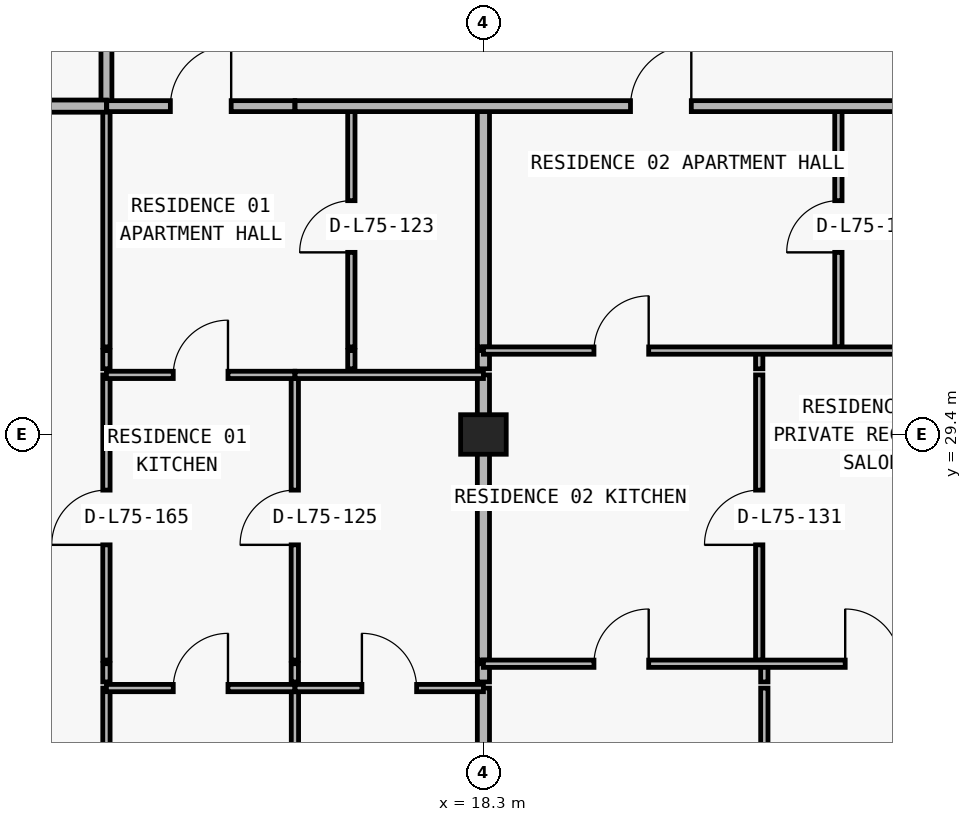
"""IFC4 building model, lengths in metres.
Left out: names, types, materials, properties, quantities, classifications, styles, units other than length and angle.
Written with IfcOpenShell. Run it as: python <this file> out.ifc"""

import sys

from ifc_helpers import new_model, si_unit, direction, frame, frame_2d, origin, origin_2d, place, context, subcontext, project, spatial, rectangle, extrude, element, fill, save


model = new_model("IFC4")
c1 = context("Model", 3, precision=1e-05, world=origin(), true_north=direction((0.0, 1.0)))
c2 = subcontext(c1, "Body", "Model", "MODEL_VIEW")
j1 = project(units=[si_unit("LENGTHUNIT", "METRE"), si_unit("PLANEANGLEUNIT", "RADIAN")], contexts=[c1])
p1 = place(None, origin())
s1 = spatial("IfcSite", under=j1, at=p1, CompositionType="ELEMENT")
p2 = place(p1, origin())
s2 = spatial("IfcBuilding", under=s1, at=p2, CompositionType="ELEMENT")
p3 = place(p2, frame((0.0, 0.0, 266.1)))
s3 = spatial("IfcBuildingStorey", under=s2, at=p3, CompositionType="ELEMENT", Elevation=266.1)
p4 = place(p3, frame((18.3, 29.4, 0.0), z_axis=(0.0, 0.0, 1.0), x_axis=(1.0, 0.0, 0.0)))
e1 = element("IfcColumn", 1, at=p4, inside=s3, PredefinedType="COLUMN", context=c2, shape_type="SweptSolid", body=[
    extrude(rectangle(XDim=0.75, YDim=0.65, at=origin_2d()), origin(), (0.0, 0.0, 1.0), 3.0),
])
p5 = place(p3, frame((12.1, 13.385, 0.0), z_axis=(0.0, 0.0, 1.0), x_axis=(0.0, 1.0, 0.0)))
e2 = element("IfcWall", 2, at=p5, inside=s3, PredefinedType="PARTITIONING", context=c2, shape_type="SweptSolid", body=[
    extrude(rectangle(XDim=11.845, YDim=0.12, at=frame_2d((5.922, 0.0))), origin(), (0.0, 0.0, 1.0), 3.0),
])
p6 = place(p3, frame((12.1, 25.33, 0.0), z_axis=(0.0, 0.0, 1.0), x_axis=(0.0, 1.0, 0.0)))
e3 = element("IfcWall", 3, at=p6, inside=s3, PredefinedType="PARTITIONING", context=c2, shape_type="SweptSolid", body=[
    extrude(rectangle(XDim=0.3, YDim=0.12, at=frame_2d((0.15, 0.0))), origin(), (0.0, 0.0, 1.0), 3.0),
])
p7 = place(p3, frame((12.1, 25.69, 0.0), z_axis=(0.0, 0.0, 1.0), x_axis=(0.0, 1.0, 0.0)))
e4 = element("IfcWall", 4, at=p7, inside=s3, PredefinedType="PARTITIONING", context=c2, shape_type="SweptSolid", body=[
    extrude(rectangle(XDim=4.69, YDim=0.12, at=frame_2d((2.345, 0.0))), origin(), (0.0, 0.0, 1.0), 3.0),
])
p8 = place(p7, frame((1.895, 0.0, 0.0)))
e5 = element("IfcOpeningElement", 5, at=p8, cuts=e4, PredefinedType="OPENING", context=c2, shape_type="SweptSolid", body=[
    extrude(rectangle(XDim=0.9, YDim=2.15, at=frame_2d((0.45, 1.075))), frame((0.0, 0.07, 0.0), z_axis=(0.0, -1.0, 0.0), x_axis=(1.0, 0.0, 0.0)), (0.0, 0.0, 1.0), 0.14),
])
p9 = place(p3, frame((12.1, 30.48, 0.0), z_axis=(0.0, 0.0, 1.0), x_axis=(0.0, 1.0, 0.0)))
e6 = element("IfcWall", 6, at=p9, inside=s3, PredefinedType="PARTITIONING", context=c2, shape_type="SweptSolid", body=[
    extrude(rectangle(XDim=0.3, YDim=0.12, at=frame_2d((0.15, 0.0))), origin(), (0.0, 0.0, 1.0), 3.0),
])
p10 = place(p3, frame((12.1, 30.84, 0.0), z_axis=(0.0, 0.0, 1.0), x_axis=(0.0, 1.0, 0.0)))
e7 = element("IfcWall", 7, at=p10, inside=s3, PredefinedType="PARTITIONING", context=c2, shape_type="SweptSolid", body=[
    extrude(rectangle(XDim=3.96, YDim=0.12, at=frame_2d((1.98, 0.0))), origin(), (0.0, 0.0, 1.0), 3.0),
])
p11 = place(p3, frame((12.1, 34.805, 0.0), z_axis=(0.0, 0.0, 1.0), x_axis=(0.0, 1.0, 0.0)))
e8 = element("IfcWall", 8, at=p11, inside=s3, PredefinedType="PARTITIONING", context=c2, shape_type="SweptSolid", body=[
    extrude(rectangle(XDim=2.195, YDim=0.18, at=frame_2d((1.098, 0.0))), origin(), (0.0, 0.0, 1.0), 3.0),
])
p12 = place(p3, frame((15.198, 25.33, 0.0), z_axis=(0.0, 0.0, 1.0), x_axis=(0.0, 1.0, 0.0)))
e9 = element("IfcWall", 9, at=p12, inside=s3, PredefinedType="PARTITIONING", context=c2, shape_type="SweptSolid", body=[
    extrude(rectangle(XDim=0.3, YDim=0.12, at=frame_2d((0.15, 0.0))), origin(), (0.0, 0.0, 1.0), 3.0),
])
p13 = place(p3, frame((15.198, 25.69, 0.0), z_axis=(0.0, 0.0, 1.0), x_axis=(0.0, 1.0, 0.0)))
e10 = element("IfcWall", 10, at=p13, inside=s3, PredefinedType="PARTITIONING", context=c2, shape_type="SweptSolid", body=[
    extrude(rectangle(XDim=4.69, YDim=0.12, at=frame_2d((2.345, 0.0))), origin(), (0.0, 0.0, 1.0), 3.0),
])
p14 = place(p13, frame((1.895, 0.0, 0.0)))
e11 = element("IfcOpeningElement", 11, at=p14, cuts=e10, PredefinedType="OPENING", context=c2, shape_type="SweptSolid", body=[
    extrude(rectangle(XDim=0.9, YDim=2.15, at=frame_2d((0.45, 1.075))), frame((0.0, 0.07, 0.0), z_axis=(0.0, -1.0, 0.0), x_axis=(1.0, 0.0, 0.0)), (0.0, 0.0, 1.0), 0.14),
])
p15 = place(p3, frame((15.2, 13.34, 0.0), z_axis=(0.0, 0.0, 1.0), x_axis=(0.0, 1.0, 0.0)))
e12 = element("IfcWall", 12, at=p15, inside=s3, PredefinedType="PARTITIONING", context=c2, shape_type="SweptSolid", body=[
    extrude(rectangle(XDim=11.89, YDim=0.12, at=frame_2d((5.945, 0.0))), origin(), (0.0, 0.0, 1.0), 3.0),
])
p16 = place(p3, frame((16.128, 30.48, 0.0), z_axis=(0.0, 0.0, 1.0), x_axis=(0.0, 1.0, 0.0)))
e13 = element("IfcWall", 13, at=p16, inside=s3, PredefinedType="PARTITIONING", context=c2, shape_type="SweptSolid", body=[
    extrude(rectangle(XDim=0.3, YDim=0.12, at=frame_2d((0.15, 0.0))), origin(), (0.0, 0.0, 1.0), 3.0),
])
p17 = place(p3, frame((16.128, 30.84, 0.0), z_axis=(0.0, 0.0, 1.0), x_axis=(0.0, 1.0, 0.0)))
e14 = element("IfcWall", 14, at=p17, inside=s3, PredefinedType="PARTITIONING", context=c2, shape_type="SweptSolid", body=[
    extrude(rectangle(XDim=3.96, YDim=0.12, at=frame_2d((1.98, 0.0))), origin(), (0.0, 0.0, 1.0), 3.0),
])
p18 = place(p17, frame((1.555, 0.0, 0.0)))
e15 = element("IfcOpeningElement", 15, at=p18, cuts=e14, PredefinedType="OPENING", context=c2, shape_type="SweptSolid", body=[
    extrude(rectangle(XDim=0.85, YDim=2.1, at=frame_2d((0.425, 1.05))), frame((0.0, 0.07, 0.0), z_axis=(0.0, -1.0, 0.0), x_axis=(1.0, 0.0, 0.0)), (0.0, 0.0, 1.0), 0.14),
])
p19 = place(p3, frame((18.3, 13.34, 0.0), z_axis=(0.0, 0.0, 1.0), x_axis=(0.0, 1.0, 0.0)))
e16 = element("IfcWall", 16, at=p19, inside=s3, PredefinedType="PARTITIONING", context=c2, shape_type="SweptSolid", body=[
    extrude(rectangle(XDim=11.89, YDim=0.2, at=frame_2d((5.945, 0.0))), origin(), (0.0, 0.0, 1.0), 2.213),
])
p20 = place(p3, frame((18.3, 25.33, 0.0), z_axis=(0.0, 0.0, 1.0), x_axis=(0.0, 1.0, 0.0)))
e17 = element("IfcWall", 17, at=p20, inside=s3, PredefinedType="PARTITIONING", context=c2, shape_type="SweptSolid", body=[
    extrude(rectangle(XDim=0.3, YDim=0.2, at=frame_2d((0.15, 0.0))), origin(), (0.0, 0.0, 1.0), 2.213),
])
p21 = place(p3, frame((18.3, 25.69, 0.0), z_axis=(0.0, 0.0, 1.0), x_axis=(0.0, 1.0, 0.0)))
e18 = element("IfcWall", 18, at=p21, inside=s3, PredefinedType="PARTITIONING", context=c2, shape_type="SweptSolid", body=[
    extrude(rectangle(XDim=4.69, YDim=0.2, at=frame_2d((2.345, 0.0))), origin(), (0.0, 0.0, 1.0), 2.213),
])
p22 = place(p3, frame((18.3, 30.48, 0.0), z_axis=(0.0, 0.0, 1.0), x_axis=(0.0, 1.0, 0.0)))
e19 = element("IfcWall", 19, at=p22, inside=s3, PredefinedType="PARTITIONING", context=c2, shape_type="SweptSolid", body=[
    extrude(rectangle(XDim=0.3, YDim=0.2, at=frame_2d((0.15, 0.0))), origin(), (0.0, 0.0, 1.0), 2.213),
])
p23 = place(p3, frame((18.3, 30.84, 0.0), z_axis=(0.0, 0.0, 1.0), x_axis=(0.0, 1.0, 0.0)))
e20 = element("IfcWall", 20, at=p23, inside=s3, PredefinedType="PARTITIONING", context=c2, shape_type="SweptSolid", body=[
    extrude(rectangle(XDim=3.96, YDim=0.2, at=frame_2d((1.98, 0.0))), origin(), (0.0, 0.0, 1.0), 2.213),
])
p24 = place(p3, frame((22.836, 25.69, 0.0), z_axis=(0.0, 0.0, 1.0), x_axis=(0.0, 1.0, 0.0)))
e21 = element("IfcWall", 21, at=p24, inside=s3, PredefinedType="PARTITIONING", context=c2, shape_type="SweptSolid", body=[
    extrude(rectangle(XDim=4.69, YDim=0.12, at=frame_2d((2.345, 0.0))), origin(), (0.0, 0.0, 1.0), 3.0),
])
p25 = place(p24, frame((1.895, 0.0, 0.0)))
e22 = element("IfcOpeningElement", 22, at=p25, cuts=e21, PredefinedType="OPENING", context=c2, shape_type="SweptSolid", body=[
    extrude(rectangle(XDim=0.9, YDim=2.15, at=frame_2d((0.45, 1.075))), frame((0.0, 0.07, 0.0), z_axis=(0.0, -1.0, 0.0), x_axis=(1.0, 0.0, 0.0)), (0.0, 0.0, 1.0), 0.14),
])
p26 = place(p3, frame((22.836, 30.48, 0.0), z_axis=(0.0, 0.0, 1.0), x_axis=(0.0, 1.0, 0.0)))
e23 = element("IfcWall", 23, at=p26, inside=s3, PredefinedType="PARTITIONING", context=c2, shape_type="SweptSolid", body=[
    extrude(rectangle(XDim=0.3, YDim=0.12, at=frame_2d((0.15, 0.0))), origin(), (0.0, 0.0, 1.0), 3.0),
])
p27 = place(p3, frame((22.92, 13.34, 0.0), z_axis=(0.0, 0.0, 1.0), x_axis=(0.0, 1.0, 0.0)))
e24 = element("IfcWall", 24, at=p27, inside=s3, PredefinedType="PARTITIONING", context=c2, shape_type="SweptSolid", body=[
    extrude(rectangle(XDim=11.89, YDim=0.12, at=frame_2d((5.945, 0.0))), origin(), (0.0, 0.0, 1.0), 3.0),
])
p28 = place(p3, frame((22.92, 25.33, 0.0), z_axis=(0.0, 0.0, 1.0), x_axis=(0.0, 1.0, 0.0)))
e25 = element("IfcWall", 25, at=p28, inside=s3, PredefinedType="PARTITIONING", context=c2, shape_type="SweptSolid", body=[
    extrude(rectangle(XDim=0.3, YDim=0.12, at=frame_2d((0.15, 0.0))), origin(), (0.0, 0.0, 1.0), 3.0),
])
p29 = place(p3, frame((24.138, 30.84, 0.0), z_axis=(0.0, 0.0, 1.0), x_axis=(0.0, 1.0, 0.0)))
e26 = element("IfcWall", 26, at=p29, inside=s3, PredefinedType="PARTITIONING", context=c2, shape_type="SweptSolid", body=[
    extrude(rectangle(XDim=3.96, YDim=0.12, at=frame_2d((1.98, 0.0))), origin(), (0.0, 0.0, 1.0), 3.0),
])
p30 = place(p29, frame((1.555, 0.0, 0.0)))
e27 = element("IfcOpeningElement", 27, at=p30, cuts=e26, PredefinedType="OPENING", context=c2, shape_type="SweptSolid", body=[
    extrude(rectangle(XDim=0.85, YDim=2.1, at=frame_2d((0.425, 1.05))), frame((0.0, 0.07, 0.0), z_axis=(0.0, -1.0, 0.0), x_axis=(1.0, 0.0, 0.0)), (0.0, 0.0, 1.0), 0.14),
])
p31 = place(p3, frame((12.1, 25.23, 0.0), z_axis=(0.0, 0.0, 1.0), x_axis=(1.0, 0.0, 0.0)))
e28 = element("IfcWall", 28, at=p31, inside=s3, PredefinedType="PARTITIONING", context=c2, shape_type="SweptSolid", body=[
    extrude(rectangle(XDim=3.098, YDim=0.12, at=frame_2d((1.549, 0.0))), origin(), (0.0, 0.0, 1.0), 3.0),
])
p32 = place(p31, frame((1.099, 0.0, 0.0)))
e29 = element("IfcOpeningElement", 29, at=p32, cuts=e28, PredefinedType="OPENING", context=c2, shape_type="SweptSolid", body=[
    extrude(rectangle(XDim=0.9, YDim=2.15, at=frame_2d((0.45, 1.075))), frame((0.0, 0.07, 0.0), z_axis=(0.0, -1.0, 0.0), x_axis=(1.0, 0.0, 0.0)), (0.0, 0.0, 1.0), 0.14),
])
p33 = place(p3, frame((15.203, 25.23, 0.0), z_axis=(0.0, 0.0, 1.0), x_axis=(1.0, 0.0, 0.0)))
e30 = element("IfcWall", 30, at=p33, inside=s3, PredefinedType="PARTITIONING", context=c2, shape_type="SweptSolid", body=[
    extrude(rectangle(XDim=3.097, YDim=0.12, at=frame_2d((1.549, 0.0))), origin(), (0.0, 0.0, 1.0), 3.0),
])
p34 = place(p33, frame((1.098, 0.0, 0.0)))
e31 = element("IfcOpeningElement", 31, at=p34, cuts=e30, PredefinedType="OPENING", context=c2, shape_type="SweptSolid", body=[
    extrude(rectangle(XDim=0.9, YDim=2.15, at=frame_2d((0.45, 1.075))), frame((0.0, 0.07, 0.0), z_axis=(0.0, -1.0, 0.0), x_axis=(1.0, 0.0, 0.0)), (0.0, 0.0, 1.0), 0.14),
])
p35 = place(p3, frame((18.3, 25.63, 0.0), z_axis=(0.0, 0.0, 1.0), x_axis=(1.0, 0.0, 0.0)))
e32 = element("IfcWall", 32, at=p35, inside=s3, PredefinedType="PARTITIONING", context=c2, shape_type="SweptSolid", body=[
    extrude(rectangle(XDim=8.18, YDim=0.12, at=frame_2d((4.09, 0.0))), origin(), (0.0, 0.0, 1.0), 3.0),
])
p36 = place(p35, frame((1.818, 0.0, 0.0)))
e33 = element("IfcOpeningElement", 33, at=p36, cuts=e32, PredefinedType="OPENING", context=c2, shape_type="SweptSolid", body=[
    extrude(rectangle(XDim=0.9, YDim=2.15, at=frame_2d((0.45, 1.075))), frame((0.0, 0.07, 0.0), z_axis=(0.0, -1.0, 0.0), x_axis=(1.0, 0.0, 0.0)), (0.0, 0.0, 1.0), 0.14),
])
p37 = place(p35, frame((5.95, 0.0, 0.0)))
e34 = element("IfcOpeningElement", 34, at=p37, cuts=e32, PredefinedType="OPENING", context=c2, shape_type="SweptSolid", body=[
    extrude(rectangle(XDim=0.9, YDim=2.15, at=frame_2d((0.45, 1.075))), frame((0.0, 0.07, 0.0), z_axis=(0.0, -1.0, 0.0), x_axis=(1.0, 0.0, 0.0)), (0.0, 0.0, 1.0), 0.14),
])
p38 = place(p3, frame((12.1, 30.38, 0.0), z_axis=(0.0, 0.0, 1.0), x_axis=(1.0, 0.0, 0.0)))
e35 = element("IfcWall", 35, at=p38, inside=s3, PredefinedType="PARTITIONING", context=c2, shape_type="SweptSolid", body=[
    extrude(rectangle(XDim=3.098, YDim=0.12, at=frame_2d((1.549, 0.0))), origin(), (0.0, 0.0, 1.0), 3.0),
])
p39 = place(p38, frame((1.099, 0.0, 0.0)))
e36 = element("IfcOpeningElement", 36, at=p39, cuts=e35, PredefinedType="OPENING", context=c2, shape_type="SweptSolid", body=[
    extrude(rectangle(XDim=0.9, YDim=2.15, at=frame_2d((0.45, 1.075))), frame((0.0, 0.07, 0.0), z_axis=(0.0, -1.0, 0.0), x_axis=(1.0, 0.0, 0.0)), (0.0, 0.0, 1.0), 0.14),
])
p40 = place(p3, frame((15.203, 30.38, 0.0), z_axis=(0.0, 0.0, 1.0), x_axis=(1.0, 0.0, 0.0)))
e37 = element("IfcWall", 37, at=p40, inside=s3, PredefinedType="PARTITIONING", context=c2, shape_type="SweptSolid", body=[
    extrude(rectangle(XDim=3.097, YDim=0.12, at=frame_2d((1.549, 0.0))), origin(), (0.0, 0.0, 1.0), 3.0),
])
p41 = place(p3, frame((18.3, 30.78, 0.0), z_axis=(0.0, 0.0, 1.0), x_axis=(1.0, 0.0, 0.0)))
e38 = element("IfcWall", 38, at=p41, inside=s3, PredefinedType="PARTITIONING", context=c2, shape_type="SweptSolid", body=[
    extrude(rectangle(XDim=8.4, YDim=0.12, at=frame_2d((4.2, 0.0))), origin(), (0.0, 0.0, 1.0), 3.0),
])
p42 = place(p41, frame((1.818, 0.0, 0.0)))
e39 = element("IfcOpeningElement", 39, at=p42, cuts=e38, PredefinedType="OPENING", context=c2, shape_type="SweptSolid", body=[
    extrude(rectangle(XDim=0.9, YDim=2.15, at=frame_2d((0.45, 1.075))), frame((0.0, 0.07, 0.0), z_axis=(0.0, -1.0, 0.0), x_axis=(1.0, 0.0, 0.0)), (0.0, 0.0, 1.0), 0.14),
])
p43 = place(p3, frame((8.395, 34.8, 0.0), z_axis=(0.0, 0.0, 1.0), x_axis=(1.0, 0.0, 0.0)))
e40 = element("IfcWall", 40, at=p43, inside=s3, PredefinedType="PARTITIONING", context=c2, shape_type="SweptSolid", body=[
    extrude(rectangle(XDim=3.705, YDim=0.2, at=frame_2d((1.853, 0.0))), origin(), (0.0, 0.0, 1.0), 3.0),
])
p44 = place(p3, frame((12.105, 34.8, 0.0), z_axis=(0.0, 0.0, 1.0), x_axis=(1.0, 0.0, 0.0)))
e41 = element("IfcWall", 41, at=p44, inside=s3, PredefinedType="PARTITIONING", context=c2, shape_type="SweptSolid", body=[
    extrude(rectangle(XDim=3.093, YDim=0.18, at=frame_2d((1.546, 0.0))), origin(), (0.0, 0.0, 1.0), 3.0),
])
p45 = place(p44, frame((1.046, 0.0, 0.0)))
e42 = element("IfcOpeningElement", 42, at=p45, cuts=e41, PredefinedType="OPENING", context=c2, shape_type="SweptSolid", body=[
    extrude(rectangle(XDim=1.0, YDim=2.2, at=frame_2d((0.5, 1.1))), frame((0.0, 0.1, 0.0), z_axis=(0.0, -1.0, 0.0), x_axis=(1.0, 0.0, 0.0)), (0.0, 0.0, 1.0), 0.2),
])
p46 = place(p3, frame((15.203, 34.8, 0.0), z_axis=(0.0, 0.0, 1.0), x_axis=(1.0, 0.0, 0.0)))
e43 = element("IfcWall", 43, at=p46, inside=s3, PredefinedType="PARTITIONING", context=c2, shape_type="SweptSolid", body=[
    extrude(rectangle(XDim=16.283, YDim=0.18, at=frame_2d((8.142, 0.0))), origin(), (0.0, 0.0, 1.0), 3.0),
])
p47 = place(p46, frame((5.516, 0.0, 0.0)))
e44 = element("IfcOpeningElement", 44, at=p47, cuts=e43, PredefinedType="OPENING", context=c2, shape_type="SweptSolid", body=[
    extrude(rectangle(XDim=1.0, YDim=2.2, at=frame_2d((0.5, 1.1))), frame((0.0, 0.1, 0.0), z_axis=(0.0, -1.0, 0.0), x_axis=(1.0, 0.0, 0.0)), (0.0, 0.0, 1.0), 0.2),
])
p48 = place(p46, frame((13.39, 0.0, 0.0)))
e45 = element("IfcOpeningElement", 45, at=p48, cuts=e43, PredefinedType="OPENING", context=c2, shape_type="SweptSolid", body=[
    extrude(rectangle(XDim=1.0, YDim=2.2, at=frame_2d((0.5, 1.1))), frame((0.0, 0.1, 0.0), z_axis=(0.0, -1.0, 0.0), x_axis=(1.0, 0.0, 0.0)), (0.0, 0.0, 1.0), 0.2),
])
p49 = place(p45, origin())
e46 = element("IfcDoor", 46, at=p49, inside=s3, OperationType="SINGLE_SWING_RIGHT", PredefinedType="DOOR", context=c2, shape_type="SweptSolid", body=[
    extrude(rectangle(XDim=1.0, YDim=2.2, at=frame_2d((0.5, 1.1))), frame((0.0, 0.025, 0.0), z_axis=(0.0, -1.0, 0.0), x_axis=(1.0, 0.0, 0.0)), (0.0, 0.0, 1.0), 0.05),
])
fill(e42, e46)
p50 = place(p18, origin())
e47 = element("IfcDoor", 47, at=p50, inside=s3, OperationType="SINGLE_SWING_LEFT", PredefinedType="DOOR", context=c2, shape_type="SweptSolid", body=[
    extrude(rectangle(XDim=0.85, YDim=2.1, at=frame_2d((0.425, 1.05))), frame((0.0, 0.025, 0.0), z_axis=(0.0, -1.0, 0.0), x_axis=(1.0, 0.0, 0.0)), (0.0, 0.0, 1.0), 0.05),
])
fill(e15, e47)
p51 = place(p39, origin())
e48 = element("IfcDoor", 48, at=p51, inside=s3, OperationType="SINGLE_SWING_RIGHT", PredefinedType="DOOR", context=c2, shape_type="SweptSolid", body=[
    extrude(rectangle(XDim=0.9, YDim=2.15, at=frame_2d((0.45, 1.075))), frame((0.0, 0.025, 0.0), z_axis=(0.0, -1.0, 0.0), x_axis=(1.0, 0.0, 0.0)), (0.0, 0.0, 1.0), 0.05),
])
fill(e36, e48)
p52 = place(p14, origin())
e49 = element("IfcDoor", 49, at=p52, inside=s3, OperationType="SINGLE_SWING_LEFT", PredefinedType="DOOR", context=c2, shape_type="SweptSolid", body=[
    extrude(rectangle(XDim=0.9, YDim=2.15, at=frame_2d((0.45, 1.075))), frame((0.0, 0.025, 0.0), z_axis=(0.0, -1.0, 0.0), x_axis=(1.0, 0.0, 0.0)), (0.0, 0.0, 1.0), 0.05),
])
fill(e11, e49)
p53 = place(p32, origin())
e50 = element("IfcDoor", 50, at=p53, inside=s3, OperationType="SINGLE_SWING_RIGHT", PredefinedType="DOOR", context=c2, shape_type="SweptSolid", body=[
    extrude(rectangle(XDim=0.9, YDim=2.15, at=frame_2d((0.45, 1.075))), frame((0.0, 0.025, 0.0), z_axis=(0.0, -1.0, 0.0), x_axis=(1.0, 0.0, 0.0)), (0.0, 0.0, 1.0), 0.05),
])
fill(e29, e50)
p54 = place(p34, origin())
e51 = element("IfcDoor", 51, at=p54, inside=s3, OperationType="SINGLE_SWING_LEFT", PredefinedType="DOOR", context=c2, shape_type="SweptSolid", body=[
    extrude(rectangle(XDim=0.9, YDim=2.15, at=frame_2d((0.45, 1.075))), frame((0.0, 0.025, 0.0), z_axis=(0.0, -1.0, 0.0), x_axis=(1.0, 0.0, 0.0)), (0.0, 0.0, 1.0), 0.05),
])
fill(e31, e51)
p55 = place(p47, origin())
e52 = element("IfcDoor", 52, at=p55, inside=s3, OperationType="SINGLE_SWING_RIGHT", PredefinedType="DOOR", context=c2, shape_type="SweptSolid", body=[
    extrude(rectangle(XDim=1.0, YDim=2.2, at=frame_2d((0.5, 1.1))), frame((0.0, 0.025, 0.0), z_axis=(0.0, -1.0, 0.0), x_axis=(1.0, 0.0, 0.0)), (0.0, 0.0, 1.0), 0.05),
])
fill(e44, e52)
p56 = place(p30, origin())
e53 = element("IfcDoor", 53, at=p56, inside=s3, OperationType="SINGLE_SWING_LEFT", PredefinedType="DOOR", context=c2, shape_type="SweptSolid", body=[
    extrude(rectangle(XDim=0.85, YDim=2.1, at=frame_2d((0.425, 1.05))), frame((0.0, 0.025, 0.0), z_axis=(0.0, -1.0, 0.0), x_axis=(1.0, 0.0, 0.0)), (0.0, 0.0, 1.0), 0.05),
])
fill(e27, e53)
p57 = place(p42, origin())
e54 = element("IfcDoor", 54, at=p57, inside=s3, OperationType="SINGLE_SWING_RIGHT", PredefinedType="DOOR", context=c2, shape_type="SweptSolid", body=[
    extrude(rectangle(XDim=0.9, YDim=2.15, at=frame_2d((0.45, 1.075))), frame((0.0, 0.025, 0.0), z_axis=(0.0, -1.0, 0.0), x_axis=(1.0, 0.0, 0.0)), (0.0, 0.0, 1.0), 0.05),
])
fill(e39, e54)
p58 = place(p25, origin())
e55 = element("IfcDoor", 55, at=p58, inside=s3, OperationType="SINGLE_SWING_LEFT", PredefinedType="DOOR", context=c2, shape_type="SweptSolid", body=[
    extrude(rectangle(XDim=0.9, YDim=2.15, at=frame_2d((0.45, 1.075))), frame((0.0, 0.025, 0.0), z_axis=(0.0, -1.0, 0.0), x_axis=(1.0, 0.0, 0.0)), (0.0, 0.0, 1.0), 0.05),
])
fill(e22, e55)
p59 = place(p36, origin())
e56 = element("IfcDoor", 56, at=p59, inside=s3, OperationType="SINGLE_SWING_RIGHT", PredefinedType="DOOR", context=c2, shape_type="SweptSolid", body=[
    extrude(rectangle(XDim=0.9, YDim=2.15, at=frame_2d((0.45, 1.075))), frame((0.0, 0.025, 0.0), z_axis=(0.0, -1.0, 0.0), x_axis=(1.0, 0.0, 0.0)), (0.0, 0.0, 1.0), 0.05),
])
fill(e33, e56)
p60 = place(p37, origin())
e57 = element("IfcDoor", 57, at=p60, inside=s3, OperationType="SINGLE_SWING_LEFT", PredefinedType="DOOR", context=c2, shape_type="SweptSolid", body=[
    extrude(rectangle(XDim=0.9, YDim=2.15, at=frame_2d((0.45, 1.075))), frame((0.0, 0.025, 0.0), z_axis=(0.0, -1.0, 0.0), x_axis=(1.0, 0.0, 0.0)), (0.0, 0.0, 1.0), 0.05),
])
fill(e34, e57)
p61 = place(p8, origin())
e58 = element("IfcDoor", 58, at=p61, inside=s3, OperationType="SINGLE_SWING_LEFT", PredefinedType="DOOR", context=c2, shape_type="SweptSolid", body=[
    extrude(rectangle(XDim=0.9, YDim=2.15, at=frame_2d((0.45, 1.075))), frame((0.0, 0.025, 0.0), z_axis=(0.0, -1.0, 0.0), x_axis=(1.0, 0.0, 0.0)), (0.0, 0.0, 1.0), 0.05),
])
fill(e5, e58)
save(model, sys.argv[1])
